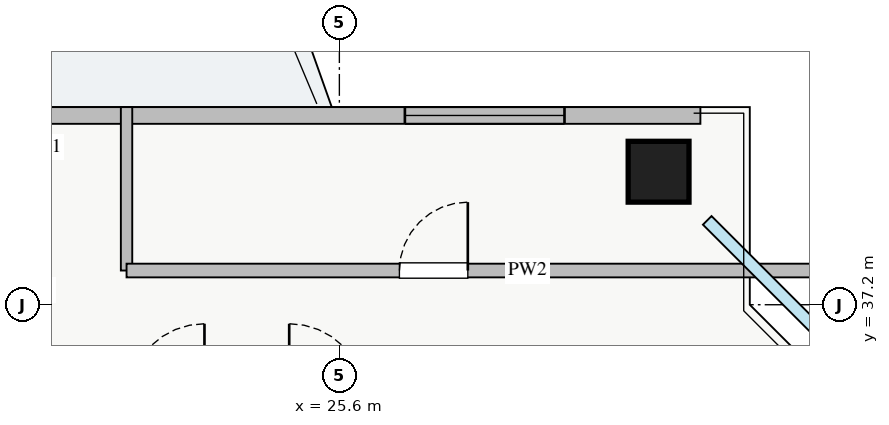
"""IFC4 building model, lengths in metres.
Left out: names, types, materials, properties, quantities, classifications, styles, units other than length and angle.
Written with IfcOpenShell. Run it as: python <this file> out.ifc"""

import sys

from ifc_helpers import new_model, si_unit, direction, frame, frame_2d, origin, origin_2d, place, context, subcontext, project, spatial, rectangle, extrude, source, transform, mapped, element, fill, save


model = new_model("IFC4")
c1 = context("Model", 3, precision=1e-05, world=origin(), true_north=direction((0.0, 1.0)))
c2 = subcontext(c1, "Body", "Model", "MODEL_VIEW")
j1 = project(units=[si_unit("LENGTHUNIT", "METRE"), si_unit("PLANEANGLEUNIT", "RADIAN")], contexts=[c1])
p1 = place(None, origin())
s1 = spatial("IfcSite", under=j1, at=p1, CompositionType="ELEMENT")
p2 = place(p1, origin())
s2 = spatial("IfcBuilding", under=s1, at=p2, CompositionType="ELEMENT")
p3 = place(p2, frame((0.0, 0.0, 206.75)))
s3 = spatial("IfcBuildingStorey", under=s2, at=p3, CompositionType="ELEMENT", Elevation=206.75)
m1 = source(origin(), c2, "Body", "SweptSolid", [
    extrude(rectangle(XDim=0.8, YDim=0.8, at=origin_2d()), origin(), (0.0, 0.0, 1.0), 3.25),
])
p4 = place(p3, frame((29.8, 38.95, 0.0), z_axis=(0.0, 0.0, 1.0), x_axis=(1.0, 0.0, 0.0)))
e1 = element("IfcColumn", 1, at=p4, inside=s3, PredefinedType="COLUMN", context=c2, shape_type="MappedRepresentation", body=[
    mapped(m1, transform((0.0, 0.0, 0.0), x_axis=(1.0, 0.0, 0.0), y_axis=(0.0, 1.0, 0.0), z_axis=(0.0, 0.0, 1.0), scale=1.0)),
])
p5 = place(p3, frame((7.65, 39.69, 0.0), z_axis=(0.0, 0.0, 1.0), x_axis=(1.0, 0.0, 0.0)))
e2 = element("IfcWall", 2, at=p5, inside=s3, PredefinedType="STANDARD", context=c2, shape_type="SweptSolid", body=[
    extrude(rectangle(XDim=22.7, YDim=0.22, at=frame_2d((11.35, 0.0))), origin(), (0.0, 0.0, 1.0), 2.61),
])
p6 = place(p5, frame((12.2, 0.0, 0.0)))
e3 = element("IfcOpeningElement", 3, at=p6, cuts=e2, PredefinedType="OPENING", context=c2, shape_type="SweptSolid", body=[
    extrude(rectangle(XDim=1.2, YDim=2.1, at=frame_2d((0.6, 1.05))), frame((0.0, 0.12, 0.0), z_axis=(0.0, -1.0, 0.0), x_axis=(1.0, 0.0, 0.0)), (0.0, 0.0, 1.0), 0.24),
])
p7 = place(p5, frame((1.637, 0.0, 0.9)))
e4 = element("IfcOpeningElement", 4, at=p7, cuts=e2, PredefinedType="OPENING", context=c2, shape_type="SweptSolid", body=[
    extrude(rectangle(XDim=2.4, YDim=1.48, at=frame_2d((1.2, 0.74))), frame((0.0, 0.12, 0.0), z_axis=(0.0, -1.0, 0.0), x_axis=(1.0, 0.0, 0.0)), (0.0, 0.0, 1.0), 0.24),
])
p8 = place(p5, frame((7.612, 0.0, 0.9)))
e5 = element("IfcOpeningElement", 5, at=p8, cuts=e2, PredefinedType="OPENING", context=c2, shape_type="SweptSolid", body=[
    extrude(rectangle(XDim=1.8, YDim=1.45, at=frame_2d((0.9, 0.725))), frame((0.0, 0.12, 0.0), z_axis=(0.0, -1.0, 0.0), x_axis=(1.0, 0.0, 0.0)), (0.0, 0.0, 1.0), 0.24),
])
p9 = place(p5, frame((18.812, 0.0, 0.9)))
e6 = element("IfcOpeningElement", 6, at=p9, cuts=e2, PredefinedType="OPENING", context=c2, shape_type="SweptSolid", body=[
    extrude(rectangle(XDim=2.1, YDim=1.48, at=frame_2d((1.05, 0.74))), frame((0.0, 0.12, 0.0), z_axis=(0.0, -1.0, 0.0), x_axis=(1.0, 0.0, 0.0)), (0.0, 0.0, 1.0), 0.24),
])
p10 = place(p3, frame((22.8, 37.65, 0.0), z_axis=(0.0, 0.0, 1.0), x_axis=(0.0, 1.0, 0.0)))
e7 = element("IfcWall", 7, at=p10, inside=s3, PredefinedType="PARTITIONING", context=c2, shape_type="SweptSolid", body=[
    extrude(rectangle(XDim=2.15, YDim=0.15, at=frame_2d((1.075, 0.0))), origin(), (0.0, 0.0, 1.0), 3.07),
])
p11 = place(p3, frame((22.8, 37.65, 0.0), z_axis=(0.0, 0.0, 1.0), x_axis=(1.0, 0.0, 0.0)))
e8 = element("IfcWall", 8, at=p11, inside=s3, PredefinedType="PARTITIONING", context=c2, shape_type="SweptSolid", body=[
    extrude(rectangle(XDim=9.65, YDim=0.18, at=frame_2d((4.825, 0.0))), origin(), (0.0, 0.0, 1.0), 3.07),
])
p12 = place(p11, frame((3.59, 0.0, 0.0)))
e9 = element("IfcOpeningElement", 9, at=p12, cuts=e8, PredefinedType="OPENING", context=c2, shape_type="SweptSolid", body=[
    extrude(rectangle(XDim=0.9, YDim=2.05, at=frame_2d((0.45, 1.025))), frame((0.0, 0.1, 0.0), z_axis=(0.0, -1.0, 0.0), x_axis=(1.0, 0.0, 0.0)), (0.0, 0.0, 1.0), 0.2),
])
m2 = source(origin(), c2, "Body", "SweptSolid", [
    extrude(rectangle(XDim=2.1, YDim=1.48, at=frame_2d((1.05, 0.74))), frame((0.0, 0.03, 0.0), z_axis=(0.0, -1.0, 0.0), x_axis=(1.0, 0.0, 0.0)), (0.0, 0.0, 1.0), 0.06),
])
p13 = place(p9, origin())
e10 = element("IfcWindow", 10, at=p13, inside=s3, PartitioningType="TRIPLE_PANEL_VERTICAL", PredefinedType="WINDOW", context=c2, shape_type="MappedRepresentation", body=[
    mapped(m2, transform((0.0, 0.0, 0.0), x_axis=(1.0, 0.0, 0.0), y_axis=(0.0, 1.0, 0.0), z_axis=(0.0, 0.0, 1.0), scale=1.0)),
])
fill(e6, e10)
m3 = source(origin(), c2, "Body", "SweptSolid", [
    extrude(rectangle(XDim=0.9, YDim=2.05, at=frame_2d((0.45, 1.025))), frame((0.0, 0.025, 0.0), z_axis=(0.0, -1.0, 0.0), x_axis=(1.0, 0.0, 0.0)), (0.0, 0.0, 1.0), 0.05),
])
p14 = place(p12, origin())
e11 = element("IfcDoor", 11, at=p14, inside=s3, OperationType="SINGLE_SWING_RIGHT", PredefinedType="DOOR", context=c2, shape_type="MappedRepresentation", body=[
    mapped(m3, transform((0.0, 0.0, 0.0), x_axis=(1.0, 0.0, 0.0), y_axis=(0.0, 1.0, 0.0), z_axis=(0.0, 0.0, 1.0), scale=1.0)),
])
fill(e9, e11)
save(model, sys.argv[1])
